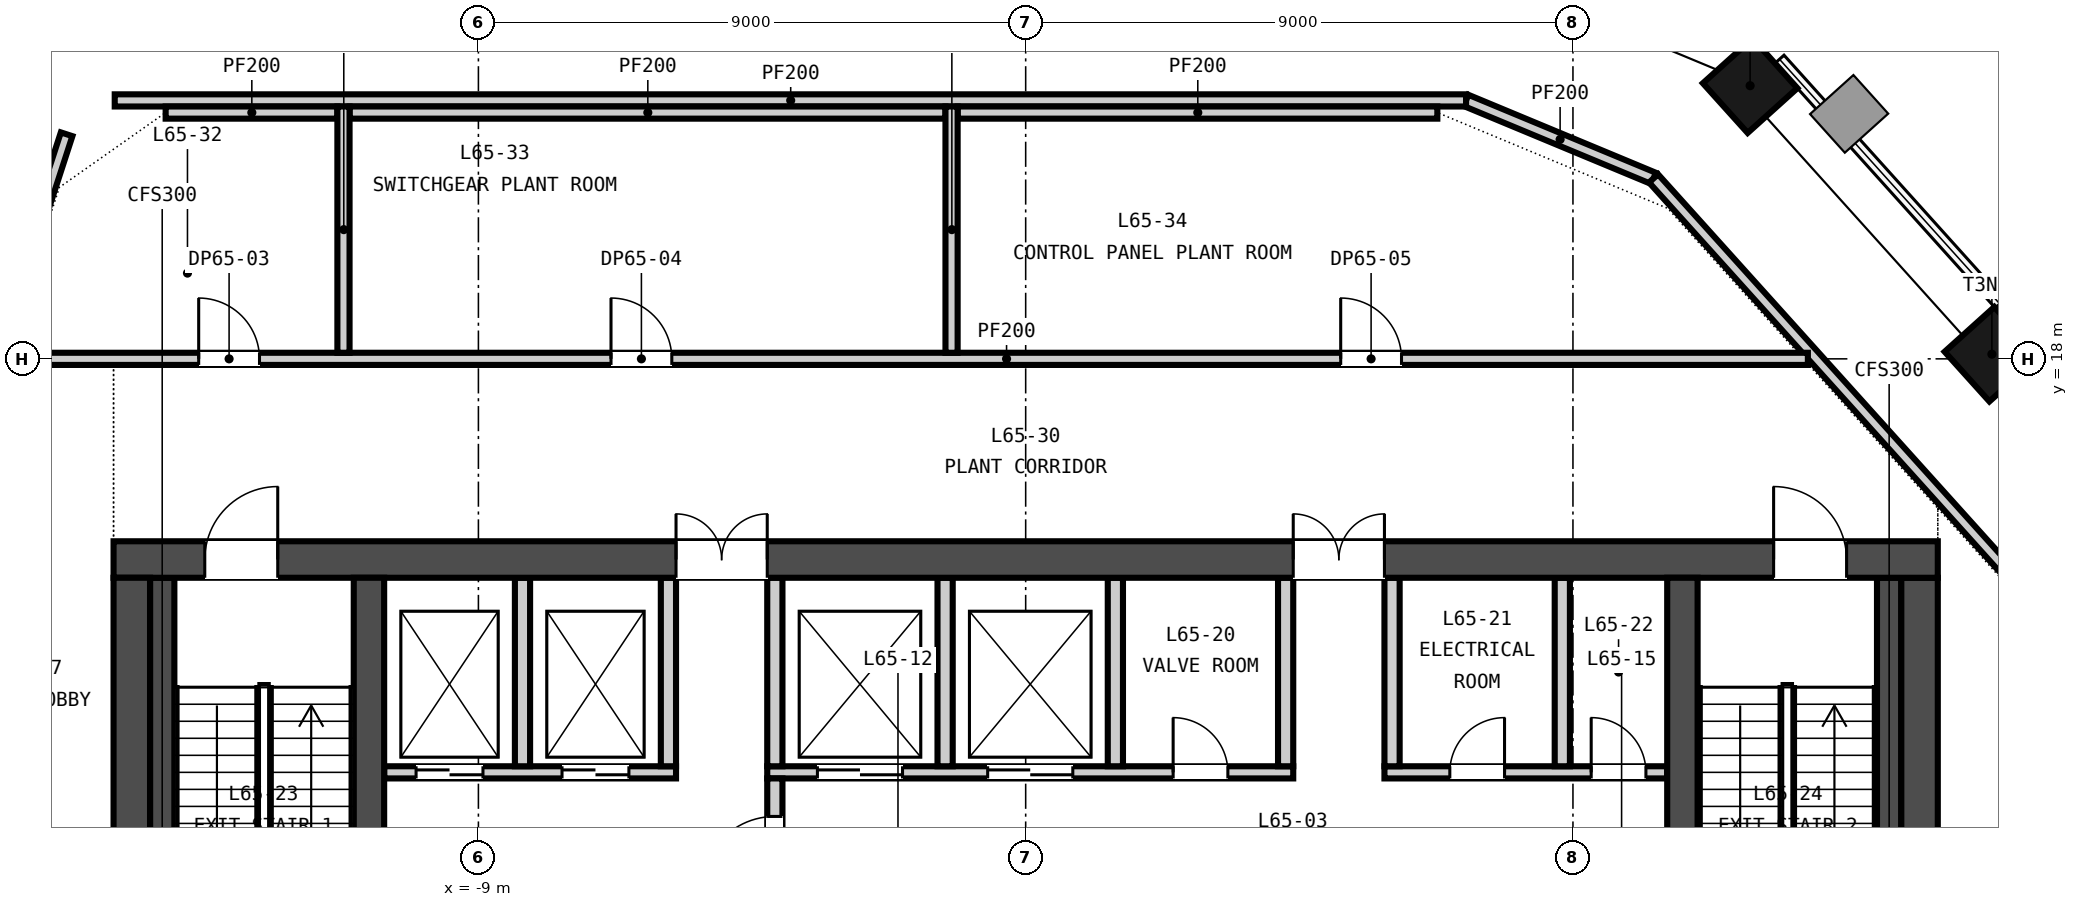
"""IFC4 building model, lengths in metres.
Left out: names, types, materials, properties, quantities, classifications, styles, units other than length and angle.
Written with IfcOpenShell. Run it as: python <this file> out.ifc"""

import sys

from ifc_helpers import new_model, si_unit, direction, frame, frame_2d, origin, origin_2d, place, context, subcontext, project, spatial, rectangle, extrude, element, fill, save


model = new_model("IFC4")
c1 = context("Model", 3, precision=1e-05, world=origin(), true_north=direction((0.0, 1.0)))
c2 = subcontext(c1, "Body", "Model", "MODEL_VIEW")
j1 = project(units=[si_unit("LENGTHUNIT", "METRE"), si_unit("PLANEANGLEUNIT", "RADIAN")], contexts=[c1])
p1 = place(None, origin())
s1 = spatial("IfcSite", under=j1, at=p1, CompositionType="ELEMENT")
p2 = place(p1, origin())
s2 = spatial("IfcBuilding", under=s1, at=p2, CompositionType="ELEMENT")
p3 = place(p2, frame((0.0, 0.0, 256.45)))
s3 = spatial("IfcBuildingStorey", under=s2, at=p3, CompositionType="ELEMENT", Elevation=256.45)
p4 = place(p3, frame((-15.0, 14.7, -0.3), z_axis=(0.0, 0.0, 1.0), x_axis=(1.0, 0.0, 0.0)))
e1 = element("IfcWall", 1, at=p4, inside=s3, PredefinedType="SOLIDWALL", context=c2, shape_type="SweptSolid", body=[
    extrude(rectangle(XDim=30.0, YDim=0.6, at=frame_2d((15.0, 0.0))), origin(), (0.0, 0.0, 1.0), 4.65),
])
p5 = place(p4, frame((9.25, 0.0, 0.3)))
e2 = element("IfcOpeningElement", 2, at=p5, cuts=e1, PredefinedType="OPENING", context=c2, shape_type="SweptSolid", body=[
    extrude(rectangle(XDim=1.5, YDim=2.1, at=frame_2d((0.75, 1.05))), frame((0.0, 0.31, 0.0), z_axis=(0.0, -1.0, 0.0), x_axis=(1.0, 0.0, 0.0)), (0.0, 0.0, 1.0), 0.62),
])
p6 = place(p4, frame((19.4, 0.0, 0.3)))
e3 = element("IfcOpeningElement", 3, at=p6, cuts=e1, PredefinedType="OPENING", context=c2, shape_type="SweptSolid", body=[
    extrude(rectangle(XDim=1.5, YDim=2.1, at=frame_2d((0.75, 1.05))), frame((0.0, 0.31, 0.0), z_axis=(0.0, -1.0, 0.0), x_axis=(1.0, 0.0, 0.0)), (0.0, 0.0, 1.0), 0.62),
])
p7 = place(p4, frame((1.5, 0.0, 0.3)))
e4 = element("IfcOpeningElement", 4, at=p7, cuts=e1, PredefinedType="OPENING", context=c2, shape_type="SweptSolid", body=[
    extrude(rectangle(XDim=1.2, YDim=2.1, at=frame_2d((0.6, 1.05))), frame((0.0, 0.31, 0.0), z_axis=(0.0, -1.0, 0.0), x_axis=(1.0, 0.0, 0.0)), (0.0, 0.0, 1.0), 0.62),
])
p8 = place(p4, frame((27.3, 0.0, 0.3)))
e5 = element("IfcOpeningElement", 5, at=p8, cuts=e1, PredefinedType="OPENING", context=c2, shape_type="SweptSolid", body=[
    extrude(rectangle(XDim=1.2, YDim=2.1, at=frame_2d((0.6, 1.05))), frame((0.0, 0.31, 0.0), z_axis=(0.0, -1.0, 0.0), x_axis=(1.0, 0.0, 0.0)), (0.0, 0.0, 1.0), 0.62),
])
for number, where, z_axis, x_axis in (
    (6, (-14.7, 0.6, -0.3), (0.0, 0.0, 1.0), (0.0, 1.0, 0.0)),
    (7, (14.7, 0.6, -0.3), (0.0, 0.0, 1.0), (0.0, 1.0, 0.0)),
):
    element("IfcWall", number, at=place(p3, frame(where, z_axis=z_axis, x_axis=x_axis)), inside=s3, PredefinedType="SOLIDWALL", context=c2, shape_type="SweptSolid", body=[
        extrude(rectangle(XDim=13.8, YDim=0.6, at=frame_2d((6.9, 0.0))), origin(), (0.0, 0.0, 1.0), 4.65),
    ])
for number, where, z_axis, x_axis in (
    (8, (-10.8, 0.6, -0.3), (0.0, 0.0, 1.0), (0.0, 1.0, 0.0)),
    (9, (10.8, 0.6, -0.3), (0.0, 0.0, 1.0), (0.0, 1.0, 0.0)),
):
    element("IfcWall", number, at=place(p3, frame(where, z_axis=z_axis, x_axis=x_axis)), inside=s3, PredefinedType="SOLIDWALL", context=c2, shape_type="SweptSolid", body=[
        extrude(rectangle(XDim=13.8, YDim=0.5, at=frame_2d((6.9, 0.0))), origin(), (0.0, 0.0, 1.0), 4.65),
    ])
for number, where, z_axis, x_axis in (
    (10, (15.89, 18.076, -0.3), (0.0, 0.0, 1.0), (-0.669, 0.743, 0.0)),
    (11, (11.914, 22.492, -0.3), (0.0, 0.0, 1.0), (-0.669, 0.743, 0.0)),
):
    element("IfcColumn", number, at=place(p3, frame(where, z_axis=z_axis, x_axis=x_axis)), inside=s3, PredefinedType="COLUMN", context=c2, shape_type="SweptSolid", body=[
        extrude(rectangle(XDim=1.1, YDim=1.1, at=origin_2d()), origin(), (0.0, 0.0, 1.0), 4.65),
    ])
p9 = place(p3, frame((-10.55, 11.2, 0.0), z_axis=(0.0, 0.0, 1.0), x_axis=(1.0, 0.0, 0.0)))
e12 = element("IfcWall", 12, at=p9, inside=s3, PredefinedType="PARTITIONING", context=c2, shape_type="SweptSolid", body=[
    extrude(rectangle(XDim=4.8, YDim=0.2, at=frame_2d((2.4, 0.0))), origin(), (0.0, 0.0, 1.0), 4.35),
])
p10 = place(p9, frame((0.525, 0.0, 0.0)))
e13 = element("IfcOpeningElement", 13, at=p10, cuts=e12, PredefinedType="OPENING", context=c2, shape_type="SweptSolid", body=[
    extrude(rectangle(XDim=1.1, YDim=2.1, at=frame_2d((0.55, 1.05))), frame((0.0, 0.11, 0.0), z_axis=(0.0, -1.0, 0.0), x_axis=(1.0, 0.0, 0.0)), (0.0, 0.0, 1.0), 0.22),
])
p11 = place(p9, frame((2.925, 0.0, 0.0)))
e14 = element("IfcOpeningElement", 14, at=p11, cuts=e12, PredefinedType="OPENING", context=c2, shape_type="SweptSolid", body=[
    extrude(rectangle(XDim=1.1, YDim=2.1, at=frame_2d((0.55, 1.05))), frame((0.0, 0.11, 0.0), z_axis=(0.0, -1.0, 0.0), x_axis=(1.0, 0.0, 0.0)), (0.0, 0.0, 1.0), 0.22),
])
p12 = place(p3, frame((-4.25, 11.2, 0.0), z_axis=(0.0, 0.0, 1.0), x_axis=(1.0, 0.0, 0.0)))
e15 = element("IfcWall", 15, at=p12, inside=s3, PredefinedType="PARTITIONING", context=c2, shape_type="SweptSolid", body=[
    extrude(rectangle(XDim=8.65, YDim=0.2, at=frame_2d((4.325, 0.0))), origin(), (0.0, 0.0, 1.0), 4.35),
])
p13 = place(p12, frame((0.825, 0.0, 0.0)))
e16 = element("IfcOpeningElement", 16, at=p13, cuts=e15, PredefinedType="OPENING", context=c2, shape_type="SweptSolid", body=[
    extrude(rectangle(XDim=1.4, YDim=2.1, at=frame_2d((0.7, 1.05))), frame((0.0, 0.11, 0.0), z_axis=(0.0, -1.0, 0.0), x_axis=(1.0, 0.0, 0.0)), (0.0, 0.0, 1.0), 0.22),
])
p14 = place(p12, frame((3.625, 0.0, 0.0)))
e17 = element("IfcOpeningElement", 17, at=p14, cuts=e15, PredefinedType="OPENING", context=c2, shape_type="SweptSolid", body=[
    extrude(rectangle(XDim=1.4, YDim=2.1, at=frame_2d((0.7, 1.05))), frame((0.0, 0.11, 0.0), z_axis=(0.0, -1.0, 0.0), x_axis=(1.0, 0.0, 0.0)), (0.0, 0.0, 1.0), 0.22),
])
p15 = place(p12, frame((6.675, 0.0, 0.0)))
e18 = element("IfcOpeningElement", 18, at=p15, cuts=e15, PredefinedType="OPENING", context=c2, shape_type="SweptSolid", body=[
    extrude(rectangle(XDim=0.9, YDim=2.1, at=frame_2d((0.45, 1.05))), frame((0.0, 0.11, 0.0), z_axis=(0.0, -1.0, 0.0), x_axis=(1.0, 0.0, 0.0)), (0.0, 0.0, 1.0), 0.22),
])
p16 = place(p3, frame((5.9, 11.2, 0.0), z_axis=(0.0, 0.0, 1.0), x_axis=(1.0, 0.0, 0.0)))
e19 = element("IfcWall", 19, at=p16, inside=s3, PredefinedType="PARTITIONING", context=c2, shape_type="SweptSolid", body=[
    extrude(rectangle(XDim=4.65, YDim=0.2, at=frame_2d((2.325, 0.0))), origin(), (0.0, 0.0, 1.0), 4.35),
])
p17 = place(p16, frame((1.075, 0.0, 0.0)))
e20 = element("IfcOpeningElement", 20, at=p17, cuts=e19, PredefinedType="OPENING", context=c2, shape_type="SweptSolid", body=[
    extrude(rectangle(XDim=0.9, YDim=2.1, at=frame_2d((0.45, 1.05))), frame((0.0, 0.11, 0.0), z_axis=(0.0, -1.0, 0.0), x_axis=(1.0, 0.0, 0.0)), (0.0, 0.0, 1.0), 0.22),
])
p18 = place(p16, frame((3.4, 0.0, 0.0)))
e21 = element("IfcOpeningElement", 21, at=p18, cuts=e19, PredefinedType="OPENING", context=c2, shape_type="SweptSolid", body=[
    extrude(rectangle(XDim=0.9, YDim=2.1, at=frame_2d((0.45, 1.05))), frame((0.0, 0.11, 0.0), z_axis=(0.0, -1.0, 0.0), x_axis=(1.0, 0.0, 0.0)), (0.0, 0.0, 1.0), 0.22),
])
p19 = place(p3, frame((-4.125, 6.15, 0.0), z_axis=(0.0, 0.0, 1.0), x_axis=(0.0, 1.0, 0.0)))
e22 = element("IfcWall", 22, at=p19, inside=s3, PredefinedType="PARTITIONING", context=c2, shape_type="SweptSolid", body=[
    extrude(rectangle(XDim=4.95, YDim=0.25, at=frame_2d((2.475, 0.0))), origin(), (0.0, 0.0, 1.0), 4.35),
])
p20 = place(p19, frame((3.125, 0.0, 0.0)))
e23 = element("IfcOpeningElement", 23, at=p20, cuts=e22, PredefinedType="OPENING", context=c2, shape_type="SweptSolid", body=[
    extrude(rectangle(XDim=1.2, YDim=2.1, at=frame_2d((0.6, 1.05))), frame((0.0, 0.135, 0.0), z_axis=(0.0, -1.0, 0.0), x_axis=(1.0, 0.0, 0.0)), (0.0, 0.0, 1.0), 0.27),
])
for number, where, z_axis, x_axis in (
    (24, (-8.275, 11.3, 0.0), (0.0, 0.0, 1.0), (0.0, 1.0, 0.0)),
    (25, (-5.875, 11.3, 0.0), (0.0, 0.0, 1.0), (0.0, 1.0, 0.0)),
    (26, (-4.125, 11.3, 0.0), (0.0, 0.0, 1.0), (0.0, 1.0, 0.0)),
    (27, (-1.325, 11.3, 0.0), (0.0, 0.0, 1.0), (0.0, 1.0, 0.0)),
    (28, (1.475, 11.3, 0.0), (0.0, 0.0, 1.0), (0.0, 1.0, 0.0)),
    (29, (4.275, 11.3, 0.0), (0.0, 0.0, 1.0), (0.0, 1.0, 0.0)),
    (30, (6.025, 11.3, 0.0), (0.0, 0.0, 1.0), (0.0, 1.0, 0.0)),
    (31, (8.825, 11.3, 0.0), (0.0, 0.0, 1.0), (0.0, 1.0, 0.0)),
):
    element("IfcWall", number, at=place(p3, frame(where, z_axis=z_axis, x_axis=x_axis)), inside=s3, PredefinedType="PARTITIONING", context=c2, shape_type="SweptSolid", body=[
        extrude(rectangle(XDim=3.1, YDim=0.25, at=frame_2d((1.55, 0.0))), origin(), (0.0, 0.0, 1.0), 4.35),
    ])
for number, where, z_axis, x_axis in (
    (32, (-14.2, 0.6, 0.0), (0.0, 0.0, 1.0), (0.0, 1.0, 0.0)),
    (33, (14.2, 0.6, 0.0), (0.0, 0.0, 1.0), (0.0, 1.0, 0.0)),
):
    element("IfcWall", number, at=place(p3, frame(where, z_axis=z_axis, x_axis=x_axis)), inside=s3, PredefinedType="SOLIDWALL", context=c2, shape_type="SweptSolid", body=[
        extrude(rectangle(XDim=13.8, YDim=0.4, at=frame_2d((6.9, 0.0))), origin(), (0.0, 0.0, 1.0), 4.35),
    ])
p21 = place(p3, frame((-16.867, 18.0, 0.0), z_axis=(0.0, 0.0, 1.0), x_axis=(1.0, 0.0, 0.0)))
e34 = element("IfcWall", 34, at=p21, inside=s3, PredefinedType="PARTITIONING", context=c2, shape_type="SweptSolid", body=[
    extrude(rectangle(XDim=29.73, YDim=0.2, at=frame_2d((14.865, 0.0))), origin(), (0.0, 0.0, 1.0), 4.35),
])
p22 = place(p21, frame((3.267, 0.0, 0.0)))
e35 = element("IfcOpeningElement", 35, at=p22, cuts=e34, PredefinedType="OPENING", context=c2, shape_type="SweptSolid", body=[
    extrude(rectangle(XDim=1.0, YDim=2.1, at=frame_2d((0.5, 1.05))), frame((0.0, 0.11, 0.0), z_axis=(0.0, -1.0, 0.0), x_axis=(1.0, 0.0, 0.0)), (0.0, 0.0, 1.0), 0.22),
])
p23 = place(p21, frame((10.048, 0.0, 0.0)))
e36 = element("IfcOpeningElement", 36, at=p23, cuts=e34, PredefinedType="OPENING", context=c2, shape_type="SweptSolid", body=[
    extrude(rectangle(XDim=1.0, YDim=2.1, at=frame_2d((0.5, 1.05))), frame((0.0, 0.11, 0.0), z_axis=(0.0, -1.0, 0.0), x_axis=(1.0, 0.0, 0.0)), (0.0, 0.0, 1.0), 0.22),
])
p24 = place(p21, frame((22.048, 0.0, 0.0)))
e37 = element("IfcOpeningElement", 37, at=p24, cuts=e34, PredefinedType="OPENING", context=c2, shape_type="SweptSolid", body=[
    extrude(rectangle(XDim=1.0, YDim=2.1, at=frame_2d((0.5, 1.05))), frame((0.0, 0.11, 0.0), z_axis=(0.0, -1.0, 0.0), x_axis=(1.0, 0.0, 0.0)), (0.0, 0.0, 1.0), 0.22),
])
p25 = place(p3, frame((-14.143, 22.05, 0.0), z_axis=(0.0, 0.0, 1.0), x_axis=(1.0, 0.0, 0.0)))
e38 = element("IfcWall", 38, at=p25, inside=s3, PredefinedType="PARTITIONING", context=c2, shape_type="SweptSolid", body=[
    extrude(rectangle(XDim=2.824, YDim=0.2, at=frame_2d((1.412, 0.0))), origin(), (0.0, 0.0, 1.0), 4.35),
])
p26 = place(p3, frame((-11.119, 22.05, 0.0), z_axis=(0.0, 0.0, 1.0), x_axis=(1.0, 0.0, 0.0)))
e39 = element("IfcWall", 39, at=p26, inside=s3, PredefinedType="PARTITIONING", context=c2, shape_type="SweptSolid", body=[
    extrude(rectangle(XDim=9.8, YDim=0.2, at=frame_2d((4.9, 0.0))), origin(), (0.0, 0.0, 1.0), 4.35),
])
p27 = place(p3, frame((-1.119, 22.05, 0.0), z_axis=(0.0, 0.0, 1.0), x_axis=(1.0, 0.0, 0.0)))
e40 = element("IfcWall", 40, at=p27, inside=s3, PredefinedType="PARTITIONING", context=c2, shape_type="SweptSolid", body=[
    extrude(rectangle(XDim=7.889, YDim=0.2, at=frame_2d((3.944, 0.0))), origin(), (0.0, 0.0, 1.0), 4.35),
])
for number, where, z_axis, x_axis in (
    (41, (-11.219, 18.1, 0.0), (0.0, 0.0, 1.0), (0.0, 1.0, 0.0)),
    (42, (-1.219, 18.1, 0.0), (0.0, 0.0, 1.0), (0.0, 1.0, 0.0)),
):
    element("IfcWall", number, at=place(p3, frame(where, z_axis=z_axis, x_axis=x_axis)), inside=s3, PredefinedType="PARTITIONING", context=c2, shape_type="SweptSolid", body=[
        extrude(rectangle(XDim=4.05, YDim=0.2, at=frame_2d((2.025, 0.0))), origin(), (0.0, 0.0, 1.0), 4.35),
    ])
p28 = place(p3, frame((7.242, 22.25, 0.0), z_axis=(0.0, 0.0, 1.0), x_axis=(0.923349222703, -0.383961212798, 0.0)))
e43 = element("IfcWall", 43, at=p28, inside=s3, PredefinedType="PARTITIONING", context=c2, shape_type="SweptSolid", body=[
    extrude(rectangle(XDim=3.339, YDim=0.2, at=frame_2d((1.67, 0.0))), origin(), (0.0, 0.0, 1.0), 4.35),
])
for number, where, z_axis, x_axis in (
    (44, (10.326, 20.968, 0.0), (0.0, 0.0, 1.0), (0.669, -0.743, 0.0)),
    (45, (-23.322, -1.542, 0.0), (0.0, 0.0, 1.0), (0.309, 0.951, 0.0)),
):
    element("IfcWall", number, at=place(p3, frame(where, z_axis=z_axis, x_axis=x_axis)), inside=s3, PredefinedType="PARTITIONING", context=c2, shape_type="SweptSolid", body=[
        extrude(rectangle(XDim=24.431, YDim=0.2, at=frame_2d((12.215, 0.0))), origin(), (0.0, 0.0, 1.0), 4.35),
    ])
p29 = place(p3, frame((-14.981, 22.25, 0.0), z_axis=(0.0, 0.0, 1.0), x_axis=(1.0, 0.0, 0.0)))
e46 = element("IfcWall", 46, at=p29, inside=s3, PredefinedType="PARTITIONING", context=c2, shape_type="SweptSolid", body=[
    extrude(rectangle(XDim=22.223, YDim=0.2, at=frame_2d((11.111, 0.0))), origin(), (0.0, 0.0, 1.0), 4.35),
])
p30 = place(p20, origin())
e47 = element("IfcDoor", 47, at=p30, inside=s3, OperationType="SINGLE_SWING_LEFT", PredefinedType="DOOR", context=c2, shape_type="SweptSolid", body=[
    extrude(rectangle(XDim=1.2, YDim=2.1, at=frame_2d((0.6, 1.05))), frame((0.0, 0.025, 0.0), z_axis=(0.0, -1.0, 0.0), x_axis=(1.0, 0.0, 0.0)), (0.0, 0.0, 1.0), 0.05),
])
fill(e23, e47)
p31 = place(p10, origin())
e48 = element("IfcDoor", 48, at=p31, inside=s3, OperationType="DOUBLE_DOOR_SLIDING", PredefinedType="DOOR", context=c2, shape_type="SweptSolid", body=[
    extrude(rectangle(XDim=1.1, YDim=2.1, at=frame_2d((0.55, 1.05))), frame((0.0, 0.025, 0.0), z_axis=(0.0, -1.0, 0.0), x_axis=(1.0, 0.0, 0.0)), (0.0, 0.0, 1.0), 0.05),
])
fill(e13, e48)
p32 = place(p11, origin())
e49 = element("IfcDoor", 49, at=p32, inside=s3, OperationType="DOUBLE_DOOR_SLIDING", PredefinedType="DOOR", context=c2, shape_type="SweptSolid", body=[
    extrude(rectangle(XDim=1.1, YDim=2.1, at=frame_2d((0.55, 1.05))), frame((0.0, 0.025, 0.0), z_axis=(0.0, -1.0, 0.0), x_axis=(1.0, 0.0, 0.0)), (0.0, 0.0, 1.0), 0.05),
])
fill(e14, e49)
p33 = place(p13, origin())
e50 = element("IfcDoor", 50, at=p33, inside=s3, OperationType="DOUBLE_DOOR_SLIDING", PredefinedType="DOOR", context=c2, shape_type="SweptSolid", body=[
    extrude(rectangle(XDim=1.4, YDim=2.1, at=frame_2d((0.7, 1.05))), frame((0.0, 0.025, 0.0), z_axis=(0.0, -1.0, 0.0), x_axis=(1.0, 0.0, 0.0)), (0.0, 0.0, 1.0), 0.05),
])
fill(e16, e50)
p34 = place(p14, origin())
e51 = element("IfcDoor", 51, at=p34, inside=s3, OperationType="DOUBLE_DOOR_SLIDING", PredefinedType="DOOR", context=c2, shape_type="SweptSolid", body=[
    extrude(rectangle(XDim=1.4, YDim=2.1, at=frame_2d((0.7, 1.05))), frame((0.0, 0.025, 0.0), z_axis=(0.0, -1.0, 0.0), x_axis=(1.0, 0.0, 0.0)), (0.0, 0.0, 1.0), 0.05),
])
fill(e17, e51)
p35 = place(p15, origin())
e52 = element("IfcDoor", 52, at=p35, inside=s3, OperationType="SINGLE_SWING_LEFT", PredefinedType="DOOR", context=c2, shape_type="SweptSolid", body=[
    extrude(rectangle(XDim=0.9, YDim=2.1, at=frame_2d((0.45, 1.05))), frame((0.0, 0.025, 0.0), z_axis=(0.0, -1.0, 0.0), x_axis=(1.0, 0.0, 0.0)), (0.0, 0.0, 1.0), 0.05),
])
fill(e18, e52)
p36 = place(p17, origin())
e53 = element("IfcDoor", 53, at=p36, inside=s3, OperationType="SINGLE_SWING_RIGHT", PredefinedType="DOOR", context=c2, shape_type="SweptSolid", body=[
    extrude(rectangle(XDim=0.9, YDim=2.1, at=frame_2d((0.45, 1.05))), frame((0.0, 0.025, 0.0), z_axis=(0.0, -1.0, 0.0), x_axis=(1.0, 0.0, 0.0)), (0.0, 0.0, 1.0), 0.05),
])
fill(e20, e53)
p37 = place(p18, origin())
e54 = element("IfcDoor", 54, at=p37, inside=s3, OperationType="SINGLE_SWING_LEFT", PredefinedType="DOOR", context=c2, shape_type="SweptSolid", body=[
    extrude(rectangle(XDim=0.9, YDim=2.1, at=frame_2d((0.45, 1.05))), frame((0.0, 0.025, 0.0), z_axis=(0.0, -1.0, 0.0), x_axis=(1.0, 0.0, 0.0)), (0.0, 0.0, 1.0), 0.05),
])
fill(e21, e54)
p38 = place(p5, origin())
e55 = element("IfcDoor", 55, at=p38, inside=s3, OperationType="DOUBLE_DOOR_SINGLE_SWING", PredefinedType="DOOR", context=c2, shape_type="SweptSolid", body=[
    extrude(rectangle(XDim=1.5, YDim=2.1, at=frame_2d((0.75, 1.05))), frame((0.0, 0.025, 0.0), z_axis=(0.0, -1.0, 0.0), x_axis=(1.0, 0.0, 0.0)), (0.0, 0.0, 1.0), 0.05),
])
fill(e2, e55)
p39 = place(p6, origin())
e56 = element("IfcDoor", 56, at=p39, inside=s3, OperationType="DOUBLE_DOOR_SINGLE_SWING", PredefinedType="DOOR", context=c2, shape_type="SweptSolid", body=[
    extrude(rectangle(XDim=1.5, YDim=2.1, at=frame_2d((0.75, 1.05))), frame((0.0, 0.025, 0.0), z_axis=(0.0, -1.0, 0.0), x_axis=(1.0, 0.0, 0.0)), (0.0, 0.0, 1.0), 0.05),
])
fill(e3, e56)
p40 = place(p7, origin())
e57 = element("IfcDoor", 57, at=p40, inside=s3, OperationType="SINGLE_SWING_RIGHT", PredefinedType="DOOR", context=c2, shape_type="SweptSolid", body=[
    extrude(rectangle(XDim=1.2, YDim=2.1, at=frame_2d((0.6, 1.05))), frame((0.0, 0.025, 0.0), z_axis=(0.0, -1.0, 0.0), x_axis=(1.0, 0.0, 0.0)), (0.0, 0.0, 1.0), 0.05),
])
fill(e4, e57)
p41 = place(p8, origin())
e58 = element("IfcDoor", 58, at=p41, inside=s3, OperationType="SINGLE_SWING_LEFT", PredefinedType="DOOR", context=c2, shape_type="SweptSolid", body=[
    extrude(rectangle(XDim=1.2, YDim=2.1, at=frame_2d((0.6, 1.05))), frame((0.0, 0.025, 0.0), z_axis=(0.0, -1.0, 0.0), x_axis=(1.0, 0.0, 0.0)), (0.0, 0.0, 1.0), 0.05),
])
fill(e5, e58)
p42 = place(p22, origin())
e59 = element("IfcDoor", 59, at=p42, inside=s3, OperationType="SINGLE_SWING_LEFT", PredefinedType="DOOR", context=c2, shape_type="SweptSolid", body=[
    extrude(rectangle(XDim=1.0, YDim=2.1, at=frame_2d((0.5, 1.05))), frame((0.0, 0.025, 0.0), z_axis=(0.0, -1.0, 0.0), x_axis=(1.0, 0.0, 0.0)), (0.0, 0.0, 1.0), 0.05),
])
fill(e35, e59)
p43 = place(p23, origin())
e60 = element("IfcDoor", 60, at=p43, inside=s3, OperationType="SINGLE_SWING_LEFT", PredefinedType="DOOR", context=c2, shape_type="SweptSolid", body=[
    extrude(rectangle(XDim=1.0, YDim=2.1, at=frame_2d((0.5, 1.05))), frame((0.0, 0.025, 0.0), z_axis=(0.0, -1.0, 0.0), x_axis=(1.0, 0.0, 0.0)), (0.0, 0.0, 1.0), 0.05),
])
fill(e36, e60)
p44 = place(p24, origin())
e61 = element("IfcDoor", 61, at=p44, inside=s3, OperationType="SINGLE_SWING_LEFT", PredefinedType="DOOR", context=c2, shape_type="SweptSolid", body=[
    extrude(rectangle(XDim=1.0, YDim=2.1, at=frame_2d((0.5, 1.05))), frame((0.0, 0.025, 0.0), z_axis=(0.0, -1.0, 0.0), x_axis=(1.0, 0.0, 0.0)), (0.0, 0.0, 1.0), 0.05),
])
fill(e37, e61)
save(model, sys.argv[1])
